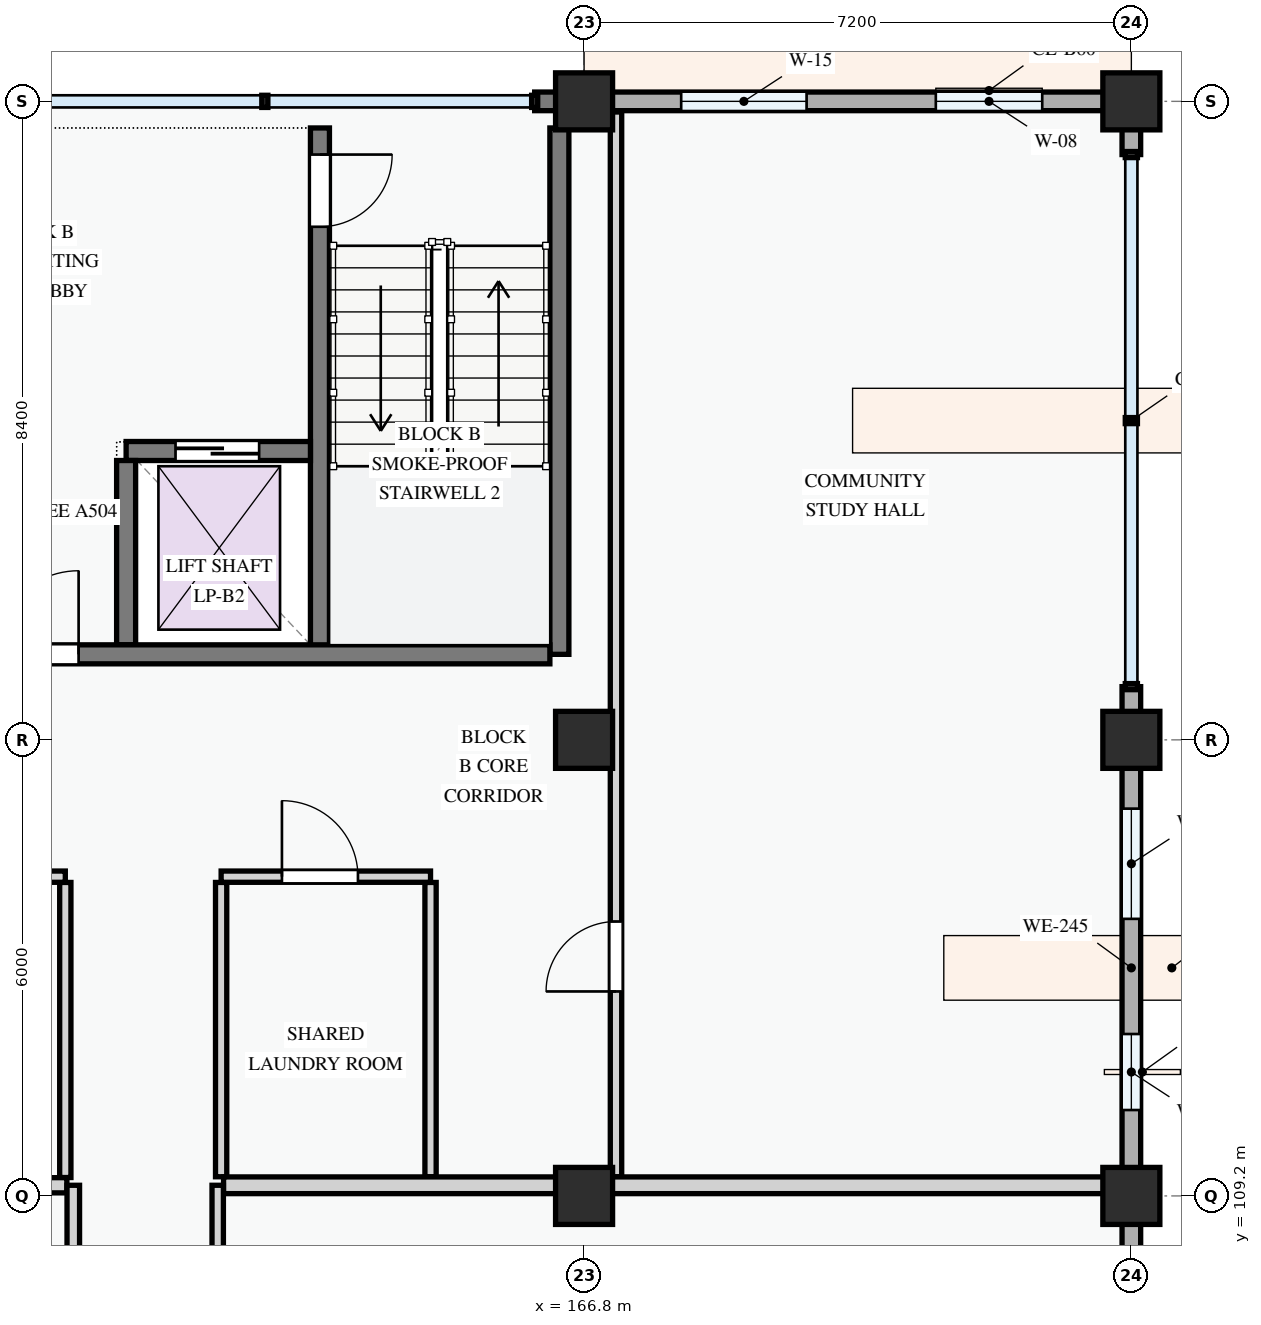
"""IFC4 building model, lengths in metres.
Left out: names, types, materials, properties, quantities, classifications, styles, units other than length and angle.
Written with IfcOpenShell. Run it as: python <this file> out.ifc"""

import sys

from ifc_helpers import new_model, si_unit, direction, frame, frame_2d, origin, origin_2d, place, context, subcontext, project, spatial, rectangle, extrude, element, fill, save


model = new_model("IFC4")
c1 = context("Model", 3, precision=1e-05, world=origin(), true_north=direction((0.0, 1.0)))
c2 = subcontext(c1, "Body", "Model", "MODEL_VIEW")
j1 = project(units=[si_unit("LENGTHUNIT", "METRE"), si_unit("PLANEANGLEUNIT", "RADIAN")], contexts=[c1])
p1 = place(None, origin())
s1 = spatial("IfcSite", under=j1, at=p1, CompositionType="ELEMENT")
p2 = place(p1, origin())
s2 = spatial("IfcBuilding", under=s1, at=p2, CompositionType="ELEMENT")
p3 = place(p2, frame((0.0, 0.0, 4.5)))
s3 = spatial("IfcBuildingStorey", under=s2, at=p3, CompositionType="ELEMENT", Elevation=4.5)
for number, where, z_axis, x_axis in (
    (1, (166.8, 109.2, 0.0), (0.0, 0.0, 1.0), (1.0, 0.0, 0.0)),
    (2, (166.8, 115.2, 0.0), (0.0, 0.0, 1.0), (1.0, 0.0, 0.0)),
    (3, (166.8, 123.6, 0.0), (0.0, 0.0, 1.0), (1.0, 0.0, 0.0)),
    (4, (174.0, 109.2, 0.0), (0.0, 0.0, 1.0), (1.0, 0.0, 0.0)),
    (5, (174.0, 115.2, 0.0), (0.0, 0.0, 1.0), (1.0, 0.0, 0.0)),
    (6, (174.0, 123.6, 0.0), (0.0, 0.0, 1.0), (1.0, 0.0, 0.0)),
):
    element("IfcColumn", number, at=place(p3, frame(where, z_axis=z_axis, x_axis=x_axis)), inside=s3, PredefinedType="COLUMN", context=c2, shape_type="SweptSolid", body=[
        extrude(rectangle(XDim=0.75, YDim=0.75, at=origin_2d()), origin(), (0.0, 0.0, 1.0), 3.6),
    ])
p4 = place(p3, frame((174.0, 109.2, 0.0), z_axis=(0.0, 0.0, 1.0), x_axis=(0.0, 1.0, 0.0)))
e7 = element("IfcWall", 7, at=p4, inside=s3, PredefinedType="STANDARD", context=c2, shape_type="SweptSolid", body=[
    extrude(rectangle(XDim=6.0, YDim=0.245, at=frame_2d((3.0, 0.0))), origin(), (0.0, 0.0, 1.0), 2.875),
])
p5 = place(p4, frame((1.13, 0.0, 0.78)))
e8 = element("IfcOpeningElement", 8, at=p5, cuts=e7, PredefinedType="OPENING", context=c2, shape_type="SweptSolid", body=[
    extrude(rectangle(XDim=1.0, YDim=1.25, at=frame_2d((0.5, 0.625))), frame((0.0, 0.133, 0.0), z_axis=(0.0, -1.0, 0.0), x_axis=(1.0, 0.0, 0.0)), (0.0, 0.0, 1.0), 0.265),
])
p6 = place(p4, frame((3.645, 0.0, 0.78)))
e9 = element("IfcOpeningElement", 9, at=p6, cuts=e7, PredefinedType="OPENING", context=c2, shape_type="SweptSolid", body=[
    extrude(rectangle(XDim=1.45, YDim=1.6, at=frame_2d((0.725, 0.8))), frame((0.0, 0.133, 0.0), z_axis=(0.0, -1.0, 0.0), x_axis=(1.0, 0.0, 0.0)), (0.0, 0.0, 1.0), 0.265),
])
p7 = place(p3, frame((174.0, 115.2, 0.0), z_axis=(0.0, 0.0, 1.0), x_axis=(0.0, 1.0, 0.0)))
e10 = element("IfcWall", 10, at=p7, inside=s3, PredefinedType="STANDARD", context=c2, shape_type="SweptSolid", body=[
    extrude(rectangle(XDim=0.7, YDim=0.245, at=frame_2d((0.35, 0.0))), origin(), (0.0, 0.0, 1.0), 2.725),
])
p8 = place(p3, frame((174.0, 122.9, 0.0), z_axis=(0.0, 0.0, 1.0), x_axis=(0.0, 1.0, 0.0)))
e11 = element("IfcWall", 11, at=p8, inside=s3, PredefinedType="STANDARD", context=c2, shape_type="SweptSolid", body=[
    extrude(rectangle(XDim=0.576, YDim=0.245, at=frame_2d((0.288, 0.0))), origin(), (0.0, 0.0, 1.0), 2.725),
])
p9 = place(p3, frame((174.0, 123.6, 0.0), z_axis=(0.0, 0.0, 1.0), x_axis=(-1.0, 0.0, 0.0)))
e12 = element("IfcWall", 12, at=p9, inside=s3, PredefinedType="STANDARD", context=c2, shape_type="SweptSolid", body=[
    extrude(rectangle(XDim=7.2, YDim=0.245, at=frame_2d((3.6, 0.0))), origin(), (0.0, 0.0, 1.0), 2.675),
])
p10 = place(p9, frame((1.173, 0.0, 0.78)))
e13 = element("IfcOpeningElement", 13, at=p10, cuts=e12, PredefinedType="OPENING", context=c2, shape_type="SweptSolid", body=[
    extrude(rectangle(XDim=1.4, YDim=1.45, at=frame_2d((0.7, 0.725))), frame((0.0, 0.133, 0.0), z_axis=(0.0, -1.0, 0.0), x_axis=(1.0, 0.0, 0.0)), (0.0, 0.0, 1.0), 0.265),
])
p11 = place(p9, frame((4.272, 0.0, 0.78)))
e14 = element("IfcOpeningElement", 14, at=p11, cuts=e12, PredefinedType="OPENING", context=c2, shape_type="SweptSolid", body=[
    extrude(rectangle(XDim=1.65, YDim=1.5, at=frame_2d((0.825, 0.75))), frame((0.0, 0.133, 0.0), z_axis=(0.0, -1.0, 0.0), x_axis=(1.0, 0.0, 0.0)), (0.0, 0.0, 1.0), 0.265),
])
p12 = place(p3, frame((166.8, 123.6, 0.0), z_axis=(0.0, 0.0, 1.0), x_axis=(-1.0, 0.0, 0.0)))
e15 = element("IfcWall", 15, at=p12, inside=s3, PredefinedType="STANDARD", context=c2, shape_type="SweptSolid", body=[
    extrude(rectangle(XDim=0.65, YDim=0.245, at=frame_2d((0.325, 0.0))), origin(), (0.0, 0.0, 1.0), 3.34),
])
p13 = place(p3, frame((174.0, 100.8, 0.0), z_axis=(0.0, 0.0, 1.0), x_axis=(0.0, 1.0, 0.0)))
e16 = element("IfcWall", 16, at=p13, inside=s3, PredefinedType="STANDARD", context=c2, shape_type="SweptSolid", body=[
    extrude(rectangle(XDim=8.4, YDim=0.245, at=frame_2d((4.2, 0.0))), origin(), (0.0, 0.0, 1.0), 2.725),
])
p14 = place(p13, frame((1.105, 0.0, 0.78)))
e17 = element("IfcOpeningElement", 17, at=p14, cuts=e16, PredefinedType="OPENING", context=c2, shape_type="SweptSolid", body=[
    extrude(rectangle(XDim=2.25, YDim=1.6, at=frame_2d((1.125, 0.8))), frame((0.0, 0.133, 0.0), z_axis=(0.0, -1.0, 0.0), x_axis=(1.0, 0.0, 0.0)), (0.0, 0.0, 1.0), 0.265),
])
p15 = place(p13, frame((4.87, 0.0, 0.78)))
e18 = element("IfcOpeningElement", 18, at=p15, cuts=e16, PredefinedType="OPENING", context=c2, shape_type="SweptSolid", body=[
    extrude(rectangle(XDim=2.6, YDim=1.7, at=frame_2d((1.3, 0.85))), frame((0.0, 0.133, 0.0), z_axis=(0.0, -1.0, 0.0), x_axis=(1.0, 0.0, 0.0)), (0.0, 0.0, 1.0), 0.265),
])
p16 = place(p3, frame((166.475, 123.25, 0.0), z_axis=(0.0, 0.0, 1.0), x_axis=(0.0, -1.0, 0.0)))
e19 = element("IfcWall", 19, at=p16, inside=s3, PredefinedType="SHEAR", context=c2, shape_type="SweptSolid", body=[
    extrude(rectangle(XDim=6.925, YDim=0.25, at=frame_2d((3.462, 0.0))), origin(), (0.0, 0.0, 1.0), 3.3),
])
p17 = place(p3, frame((163.325, 123.25, 0.0), z_axis=(0.0, 0.0, 1.0), x_axis=(0.0, -1.0, 0.0)))
e20 = element("IfcWall", 20, at=p17, inside=s3, PredefinedType="SHEAR", context=c2, shape_type="SweptSolid", body=[
    extrude(rectangle(XDim=6.925, YDim=0.25, at=frame_2d((3.462, 0.0))), origin(), (0.0, 0.0, 1.0), 3.3),
])
p18 = place(p17, frame((0.35, 0.0, 0.0)))
e21 = element("IfcOpeningElement", 21, at=p18, cuts=e20, PredefinedType="OPENING", context=c2, shape_type="SweptSolid", body=[
    extrude(rectangle(XDim=0.95, YDim=2.1, at=frame_2d((0.475, 1.05))), frame((0.0, 0.135, 0.0), z_axis=(0.0, -1.0, 0.0), x_axis=(1.0, 0.0, 0.0)), (0.0, 0.0, 1.0), 0.27),
])
p19 = place(p3, frame((160.775, 119.0, 0.0), z_axis=(0.0, 0.0, 1.0), x_axis=(1.0, 0.0, 0.0)))
e22 = element("IfcWall", 22, at=p19, inside=s3, PredefinedType="SHEAR", context=c2, shape_type="SweptSolid", body=[
    extrude(rectangle(XDim=2.425, YDim=0.25, at=frame_2d((1.212, 0.0))), origin(), (0.0, 0.0, 1.0), 3.3),
])
p20 = place(p19, frame((0.65, 0.0, 0.0)))
e23 = element("IfcOpeningElement", 23, at=p20, cuts=e22, PredefinedType="OPENING", context=c2, shape_type="SweptSolid", body=[
    extrude(rectangle(XDim=1.1, YDim=2.15, at=frame_2d((0.55, 1.075))), frame((0.0, 0.135, 0.0), z_axis=(0.0, -1.0, 0.0), x_axis=(1.0, 0.0, 0.0)), (0.0, 0.0, 1.0), 0.27),
])
p21 = place(p3, frame((160.775, 118.875, 0.0), z_axis=(0.0, 0.0, 1.0), x_axis=(0.0, -1.0, 0.0)))
e24 = element("IfcWall", 24, at=p21, inside=s3, PredefinedType="SHEAR", context=c2, shape_type="SweptSolid", body=[
    extrude(rectangle(XDim=2.425, YDim=0.25, at=frame_2d((1.212, 0.0))), origin(), (0.0, 0.0, 1.0), 3.3),
])
p22 = place(p3, frame((152.85, 116.325, 0.0), z_axis=(0.0, 0.0, 1.0), x_axis=(1.0, 0.0, 0.0)))
e25 = element("IfcWall", 25, at=p22, inside=s3, PredefinedType="SHEAR", context=c2, shape_type="SweptSolid", body=[
    extrude(rectangle(XDim=13.5, YDim=0.25, at=frame_2d((6.75, 0.0))), origin(), (0.0, 0.0, 1.0), 3.3),
])
p23 = place(p22, frame((6.2, 0.0, 0.0)))
e26 = element("IfcOpeningElement", 26, at=p23, cuts=e25, PredefinedType="OPENING", context=c2, shape_type="SweptSolid", body=[
    extrude(rectangle(XDim=1.1, YDim=2.15, at=frame_2d((0.55, 1.075))), frame((0.0, 0.135, 0.0), z_axis=(0.0, -1.0, 0.0), x_axis=(1.0, 0.0, 0.0)), (0.0, 0.0, 1.0), 0.27),
])
p24 = place(p3, frame((159.975, 113.324, 0.0), z_axis=(0.0, 0.0, 1.0), x_axis=(0.0, -1.0, 0.0)))
e27 = element("IfcWall", 27, at=p24, inside=s3, PredefinedType="PARTITIONING", context=c2, shape_type="SweptSolid", body=[
    extrude(rectangle(XDim=3.882, YDim=0.148, at=frame_2d((1.941, 0.0))), origin(), (0.0, 0.0, 1.0), 3.3),
])
for number, where, z_axis, x_axis in (
    (28, (162.025, 113.324, 0.0), (0.0, 0.0, 1.0), (0.0, -1.0, 0.0)),
    (29, (164.78, 113.324, 0.0), (0.0, 0.0, 1.0), (0.0, -1.0, 0.0)),
):
    element("IfcWall", number, at=place(p3, frame(where, z_axis=z_axis, x_axis=x_axis)), inside=s3, PredefinedType="PARTITIONING", context=c2, shape_type="SweptSolid", body=[
        extrude(rectangle(XDim=3.872, YDim=0.148, at=frame_2d((1.936, 0.0))), origin(), (0.0, 0.0, 1.0), 3.3),
    ])
p25 = place(p3, frame((154.42, 113.4, 0.0), z_axis=(0.0, 0.0, 1.0), x_axis=(1.0, 0.0, 0.0)))
e30 = element("IfcWall", 30, at=p25, inside=s3, PredefinedType="PARTITIONING", context=c2, shape_type="SweptSolid", body=[
    extrude(rectangle(XDim=5.555, YDim=0.148, at=frame_2d((2.778, 0.0))), origin(), (0.0, 0.0, 1.0), 3.3),
])
p26 = place(p25, frame((0.65, 0.0, 0.0)))
e31 = element("IfcOpeningElement", 31, at=p26, cuts=e30, PredefinedType="OPENING", context=c2, shape_type="SweptSolid", body=[
    extrude(rectangle(XDim=0.9, YDim=2.1, at=frame_2d((0.45, 1.05))), frame((0.0, 0.084, 0.0), z_axis=(0.0, -1.0, 0.0), x_axis=(1.0, 0.0, 0.0)), (0.0, 0.0, 1.0), 0.168),
])
p27 = place(p25, frame((3.2, 0.0, 0.0)))
e32 = element("IfcOpeningElement", 32, at=p27, cuts=e30, PredefinedType="OPENING", context=c2, shape_type="SweptSolid", body=[
    extrude(rectangle(XDim=0.95, YDim=2.1, at=frame_2d((0.475, 1.05))), frame((0.0, 0.084, 0.0), z_axis=(0.0, -1.0, 0.0), x_axis=(1.0, 0.0, 0.0)), (0.0, 0.0, 1.0), 0.168),
])
p28 = place(p3, frame((162.025, 113.4, 0.0), z_axis=(0.0, 0.0, 1.0), x_axis=(1.0, 0.0, 0.0)))
e33 = element("IfcWall", 33, at=p28, inside=s3, PredefinedType="PARTITIONING", context=c2, shape_type="SweptSolid", body=[
    extrude(rectangle(XDim=2.755, YDim=0.148, at=frame_2d((1.377, 0.0))), origin(), (0.0, 0.0, 1.0), 3.3),
])
p29 = place(p28, frame((0.8, 0.0, 0.0)))
e34 = element("IfcOpeningElement", 34, at=p29, cuts=e33, PredefinedType="OPENING", context=c2, shape_type="SweptSolid", body=[
    extrude(rectangle(XDim=1.0, YDim=2.15, at=frame_2d((0.5, 1.075))), frame((0.0, 0.084, 0.0), z_axis=(0.0, -1.0, 0.0), x_axis=(1.0, 0.0, 0.0)), (0.0, 0.0, 1.0), 0.168),
])
p30 = place(p3, frame((167.22, 109.452, 0.0), z_axis=(0.0, 0.0, 1.0), x_axis=(0.0, 1.0, 0.0)))
e35 = element("IfcWall", 35, at=p30, inside=s3, PredefinedType="PARTITIONING", context=c2, shape_type="SweptSolid", body=[
    extrude(rectangle(XDim=14.008, YDim=0.15, at=frame_2d((7.004, 0.0))), origin(), (0.0, 0.0, 1.0), 2.725),
])
p31 = place(p30, frame((2.438, 0.0, 0.0)))
e36 = element("IfcOpeningElement", 36, at=p31, cuts=e35, PredefinedType="OPENING", context=c2, shape_type="SweptSolid", body=[
    extrude(rectangle(XDim=0.92, YDim=2.1, at=frame_2d((0.46, 1.05))), frame((0.0, 0.085, 0.0), z_axis=(0.0, -1.0, 0.0), x_axis=(1.0, 0.0, 0.0)), (0.0, 0.0, 1.0), 0.17),
])
p32 = place(p3, frame((152.46, 109.34, 0.0), z_axis=(0.0, 0.0, 1.0), x_axis=(1.0, 0.0, 0.0)))
e37 = element("IfcWall", 37, at=p32, inside=s3, PredefinedType="PARTITIONING", context=c2, shape_type="SweptSolid", body=[
    extrude(rectangle(XDim=7.536, YDim=0.2, at=frame_2d((3.768, 0.0))), origin(), (0.0, 0.0, 1.0), 2.675),
])
p33 = place(p3, frame((162.057, 109.34, 0.0), z_axis=(0.0, 0.0, 1.0), x_axis=(1.0, 0.0, 0.0)))
e38 = element("IfcWall", 38, at=p33, inside=s3, PredefinedType="PARTITIONING", context=c2, shape_type="SweptSolid", body=[
    extrude(rectangle(XDim=11.819, YDim=0.22, at=frame_2d((5.909, 0.0))), origin(), (0.0, 0.0, 1.0), 2.675),
])
p34 = place(p3, frame((160.08, 80.46, 0.0), z_axis=(0.0, 0.0, 1.0), x_axis=(0.0, 1.0, 0.0)))
e39 = element("IfcWall", 39, at=p34, inside=s3, PredefinedType="PARTITIONING", context=c2, shape_type="SweptSolid", body=[
    extrude(rectangle(XDim=28.88, YDim=0.165, at=frame_2d((14.44, 0.0))), origin(), (0.0, 0.0, 1.0), 3.3),
])
p35 = place(p34, frame((2.405, 0.0, 0.0)))
e40 = element("IfcOpeningElement", 40, at=p35, cuts=e39, PredefinedType="OPENING", context=c2, shape_type="SweptSolid", body=[
    extrude(rectangle(XDim=0.95, YDim=2.1, at=frame_2d((0.475, 1.05))), frame((0.0, 0.093, 0.0), z_axis=(0.0, -1.0, 0.0), x_axis=(1.0, 0.0, 0.0)), (0.0, 0.0, 1.0), 0.185),
])
p36 = place(p34, frame((9.708, 0.0, 0.0)))
e41 = element("IfcOpeningElement", 41, at=p36, cuts=e39, PredefinedType="OPENING", context=c2, shape_type="SweptSolid", body=[
    extrude(rectangle(XDim=0.95, YDim=2.1, at=frame_2d((0.475, 1.05))), frame((0.0, 0.093, 0.0), z_axis=(0.0, -1.0, 0.0), x_axis=(1.0, 0.0, 0.0)), (0.0, 0.0, 1.0), 0.185),
])
p37 = place(p34, frame((24.146, 0.0, 0.0)))
e42 = element("IfcOpeningElement", 42, at=p37, cuts=e39, PredefinedType="OPENING", context=c2, shape_type="SweptSolid", body=[
    extrude(rectangle(XDim=0.95, YDim=2.1, at=frame_2d((0.475, 1.05))), frame((0.0, 0.093, 0.0), z_axis=(0.0, -1.0, 0.0), x_axis=(1.0, 0.0, 0.0)), (0.0, 0.0, 1.0), 0.185),
])
p38 = place(p3, frame((161.98, 80.46, 0.0), z_axis=(0.0, 0.0, 1.0), x_axis=(0.0, 1.0, 0.0)))
e43 = element("IfcWall", 43, at=p38, inside=s3, PredefinedType="PARTITIONING", context=c2, shape_type="SweptSolid", body=[
    extrude(rectangle(XDim=28.88, YDim=0.15, at=frame_2d((14.44, 0.0))), origin(), (0.0, 0.0, 1.0), 3.3),
])
p39 = place(p38, frame((2.402, 0.0, 0.0)))
e44 = element("IfcOpeningElement", 44, at=p39, cuts=e43, PredefinedType="OPENING", context=c2, shape_type="SweptSolid", body=[
    extrude(rectangle(XDim=0.92, YDim=2.1, at=frame_2d((0.46, 1.05))), frame((0.0, 0.085, 0.0), z_axis=(0.0, -1.0, 0.0), x_axis=(1.0, 0.0, 0.0)), (0.0, 0.0, 1.0), 0.17),
])
p40 = place(p38, frame((9.705, 0.0, 0.0)))
e45 = element("IfcOpeningElement", 45, at=p40, cuts=e43, PredefinedType="OPENING", context=c2, shape_type="SweptSolid", body=[
    extrude(rectangle(XDim=0.92, YDim=2.1, at=frame_2d((0.46, 1.05))), frame((0.0, 0.085, 0.0), z_axis=(0.0, -1.0, 0.0), x_axis=(1.0, 0.0, 0.0)), (0.0, 0.0, 1.0), 0.17),
])
p41 = place(p38, frame((24.139, 0.0, 0.0)))
e46 = element("IfcOpeningElement", 46, at=p41, cuts=e43, PredefinedType="OPENING", context=c2, shape_type="SweptSolid", body=[
    extrude(rectangle(XDim=0.92, YDim=2.1, at=frame_2d((0.46, 1.05))), frame((0.0, 0.085, 0.0), z_axis=(0.0, -1.0, 0.0), x_axis=(1.0, 0.0, 0.0)), (0.0, 0.0, 1.0), 0.17),
])
p42 = place(p5, origin())
e47 = element("IfcWindow", 47, at=p42, inside=s3, PartitioningType="SINGLE_PANEL", PredefinedType="WINDOW", context=c2, shape_type="SweptSolid", body=[
    extrude(rectangle(XDim=1.0, YDim=1.25, at=frame_2d((0.5, 0.625))), frame((0.0, 0.03, 0.0), z_axis=(0.0, -1.0, 0.0), x_axis=(1.0, 0.0, 0.0)), (0.0, 0.0, 1.0), 0.06),
])
fill(e8, e47)
p43 = place(p6, origin())
e48 = element("IfcWindow", 48, at=p43, inside=s3, PartitioningType="SINGLE_PANEL", PredefinedType="WINDOW", context=c2, shape_type="SweptSolid", body=[
    extrude(rectangle(XDim=1.45, YDim=1.6, at=frame_2d((0.725, 0.8))), frame((0.0, 0.03, 0.0), z_axis=(0.0, -1.0, 0.0), x_axis=(1.0, 0.0, 0.0)), (0.0, 0.0, 1.0), 0.06),
])
fill(e9, e48)
p44 = place(p10, origin())
e49 = element("IfcWindow", 49, at=p44, inside=s3, PartitioningType="SINGLE_PANEL", PredefinedType="WINDOW", context=c2, shape_type="SweptSolid", body=[
    extrude(rectangle(XDim=1.4, YDim=1.45, at=frame_2d((0.7, 0.725))), frame((0.0, 0.03, 0.0), z_axis=(0.0, -1.0, 0.0), x_axis=(1.0, 0.0, 0.0)), (0.0, 0.0, 1.0), 0.06),
])
fill(e13, e49)
p45 = place(p11, origin())
e50 = element("IfcWindow", 50, at=p45, inside=s3, PartitioningType="DOUBLE_PANEL_VERTICAL", PredefinedType="WINDOW", context=c2, shape_type="SweptSolid", body=[
    extrude(rectangle(XDim=1.65, YDim=1.5, at=frame_2d((0.825, 0.75))), frame((0.0, 0.03, 0.0), z_axis=(0.0, -1.0, 0.0), x_axis=(1.0, 0.0, 0.0)), (0.0, 0.0, 1.0), 0.06),
])
fill(e14, e50)
p46 = place(p18, origin())
e51 = element("IfcDoor", 51, at=p46, inside=s3, OperationType="SINGLE_SWING_LEFT", PredefinedType="DOOR", context=c2, shape_type="SweptSolid", body=[
    extrude(rectangle(XDim=0.95, YDim=2.1, at=frame_2d((0.475, 1.05))), frame((0.0, 0.025, 0.0), z_axis=(0.0, -1.0, 0.0), x_axis=(1.0, 0.0, 0.0)), (0.0, 0.0, 1.0), 0.05),
])
fill(e21, e51)
p47 = place(p20, origin())
e52 = element("IfcDoor", 52, at=p47, inside=s3, OperationType="SLIDING_TO_LEFT", PredefinedType="DOOR", context=c2, shape_type="SweptSolid", body=[
    extrude(rectangle(XDim=1.1, YDim=2.15, at=frame_2d((0.55, 1.075))), frame((0.0, 0.025, 0.0), z_axis=(0.0, -1.0, 0.0), x_axis=(1.0, 0.0, 0.0)), (0.0, 0.0, 1.0), 0.05),
])
fill(e23, e52)
p48 = place(p23, origin())
e53 = element("IfcDoor", 53, at=p48, inside=s3, OperationType="SINGLE_SWING_RIGHT", PredefinedType="DOOR", context=c2, shape_type="SweptSolid", body=[
    extrude(rectangle(XDim=1.1, YDim=2.15, at=frame_2d((0.55, 1.075))), frame((0.0, 0.025, 0.0), z_axis=(0.0, -1.0, 0.0), x_axis=(1.0, 0.0, 0.0)), (0.0, 0.0, 1.0), 0.05),
])
fill(e26, e53)
p49 = place(p29, origin())
e54 = element("IfcDoor", 54, at=p49, inside=s3, OperationType="SINGLE_SWING_LEFT", PredefinedType="DOOR", context=c2, shape_type="SweptSolid", body=[
    extrude(rectangle(XDim=1.0, YDim=2.15, at=frame_2d((0.5, 1.075))), frame((0.0, 0.025, 0.0), z_axis=(0.0, -1.0, 0.0), x_axis=(1.0, 0.0, 0.0)), (0.0, 0.0, 1.0), 0.05),
])
fill(e34, e54)
p50 = place(p31, origin())
e55 = element("IfcDoor", 55, at=p50, inside=s3, OperationType="SINGLE_SWING_LEFT", PredefinedType="DOOR", context=c2, shape_type="SweptSolid", body=[
    extrude(rectangle(XDim=0.92, YDim=2.1, at=frame_2d((0.46, 1.05))), frame((0.0, 0.025, 0.0), z_axis=(0.0, -1.0, 0.0), x_axis=(1.0, 0.0, 0.0)), (0.0, 0.0, 1.0), 0.05),
])
fill(e36, e55)
save(model, sys.argv[1])
